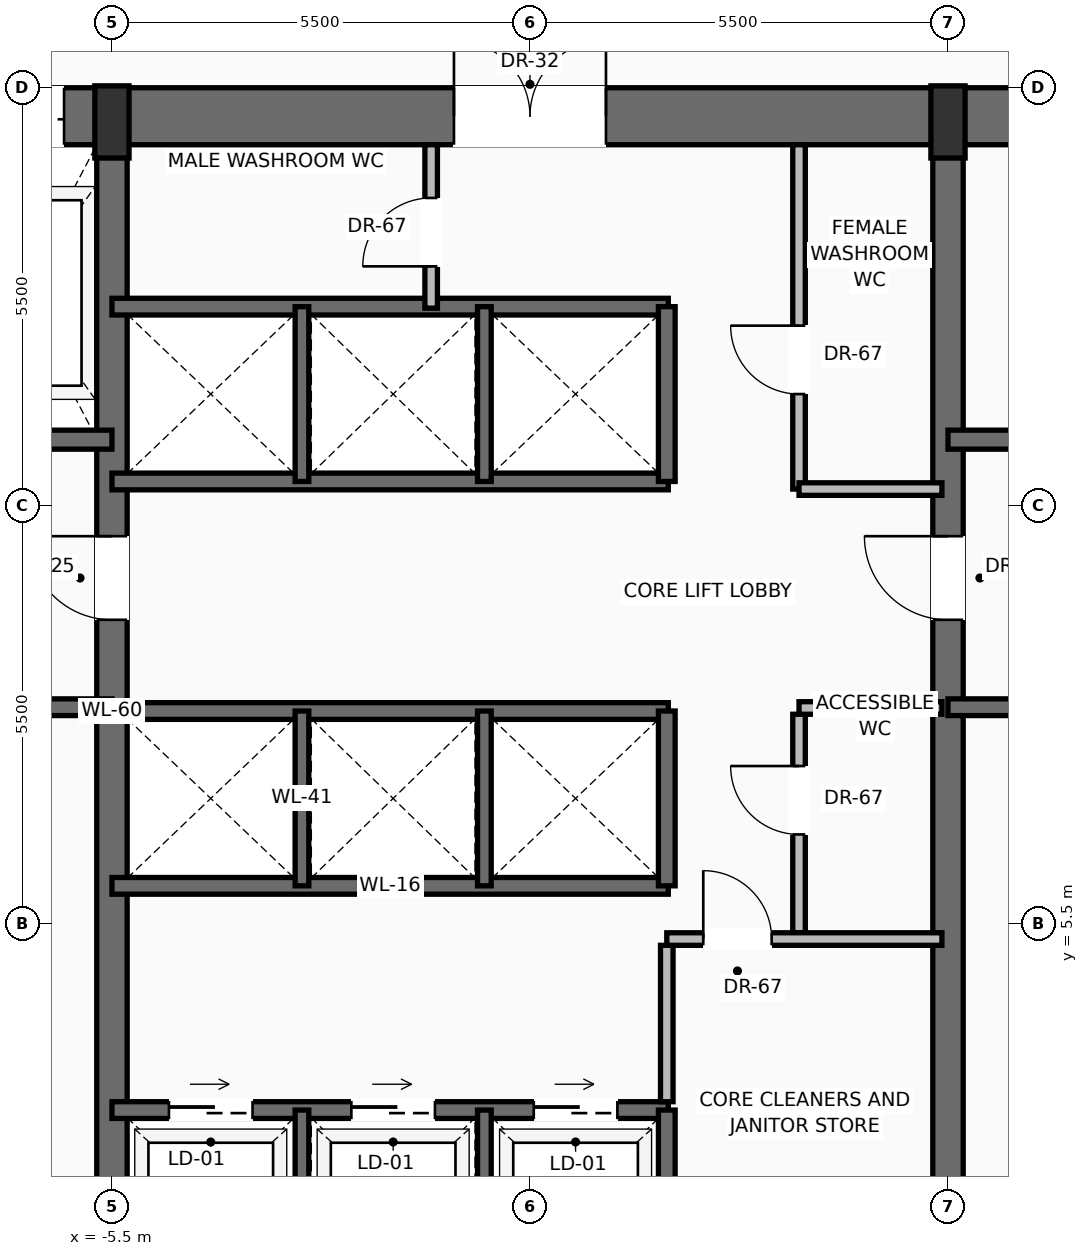
"""IFC4 building model, lengths in metres.
Left out: names, types, materials, properties, quantities, classifications, styles, units other than length and angle.
Written with IfcOpenShell. Run it as: python <this file> out.ifc"""

import sys

from ifc_helpers import new_model, si_unit, direction, frame, frame_2d, origin, origin_2d, place, context, subcontext, project, spatial, rectangle, extrude, source, transform, mapped, element, fill, save


model = new_model("IFC4")
c1 = context("Model", 3, precision=1e-05, world=origin(), true_north=direction((0.0, 1.0)))
c2 = subcontext(c1, "Body", "Model", "MODEL_VIEW")
j1 = project(units=[si_unit("LENGTHUNIT", "METRE"), si_unit("PLANEANGLEUNIT", "RADIAN")], contexts=[c1])
p1 = place(None, origin())
s1 = spatial("IfcSite", under=j1, at=p1, CompositionType="ELEMENT")
p2 = place(p1, origin())
s2 = spatial("IfcBuilding", under=s1, at=p2, CompositionType="ELEMENT")
p3 = place(p2, frame((0.0, 0.0, 84.0)))
s3 = spatial("IfcBuildingStorey", under=s2, at=p3, CompositionType="ELEMENT", Elevation=84.0)
p4 = place(p3, frame((-10.9, 16.125, 0.0), z_axis=(0.0, 0.0, 1.0), x_axis=(1.0, 0.0, 0.0)))
e1 = element("IfcWall", 1, at=p4, inside=s3, PredefinedType="SHEAR", context=c2, shape_type="SweptSolid", body=[
    extrude(rectangle(XDim=21.8, YDim=0.75, at=frame_2d((10.9, 0.0))), origin(), (0.0, 0.0, 1.0), 3.45),
])
p5 = place(p4, frame((3.47, 0.0, 0.0)))
e2 = element("IfcOpeningElement", 2, at=p5, cuts=e1, PredefinedType="OPENING", context=c2, shape_type="SweptSolid", body=[
    extrude(rectangle(XDim=1.3, YDim=2.3, at=frame_2d((0.65, 1.15))), frame((0.0, 0.385, 0.0), z_axis=(0.0, -1.0, 0.0), x_axis=(1.0, 0.0, 0.0)), (0.0, 0.0, 1.0), 0.77),
])
p6 = place(p4, frame((9.9, 0.0, 0.0)))
e3 = element("IfcOpeningElement", 3, at=p6, cuts=e1, PredefinedType="OPENING", context=c2, shape_type="SweptSolid", body=[
    extrude(rectangle(XDim=2.0, YDim=2.4, at=frame_2d((1.0, 1.2))), frame((0.0, 0.385, 0.0), z_axis=(0.0, -1.0, 0.0), x_axis=(1.0, 0.0, 0.0)), (0.0, 0.0, 1.0), 0.77),
])
p7 = place(p3, frame((-5.5, 0.475, 0.0), z_axis=(0.0, 0.0, 1.0), x_axis=(0.0, 1.0, 0.0)))
e4 = element("IfcWall", 4, at=p7, inside=s3, PredefinedType="SHEAR", context=c2, shape_type="SweptSolid", body=[
    extrude(rectangle(XDim=15.65, YDim=0.4, at=frame_2d((7.825, 0.0))), origin(), (0.0, 0.0, 1.0), 3.45),
])
p8 = place(p7, frame((9.025, 0.0, 0.0)))
e5 = element("IfcOpeningElement", 5, at=p8, cuts=e4, PredefinedType="OPENING", context=c2, shape_type="SweptSolid", body=[
    extrude(rectangle(XDim=1.1, YDim=2.2, at=frame_2d((0.55, 1.1))), frame((0.0, 0.21, 0.0), z_axis=(0.0, -1.0, 0.0), x_axis=(1.0, 0.0, 0.0)), (0.0, 0.0, 1.0), 0.42),
])
p9 = place(p3, frame((5.5, 0.475, 0.0), z_axis=(0.0, 0.0, 1.0), x_axis=(0.0, 1.0, 0.0)))
e6 = element("IfcWall", 6, at=p9, inside=s3, PredefinedType="SHEAR", context=c2, shape_type="SweptSolid", body=[
    extrude(rectangle(XDim=15.65, YDim=0.4, at=frame_2d((7.825, 0.0))), origin(), (0.0, 0.0, 1.0), 3.45),
])
p10 = place(p9, frame((9.025, 0.0, 0.0)))
e7 = element("IfcOpeningElement", 7, at=p10, cuts=e6, PredefinedType="OPENING", context=c2, shape_type="SweptSolid", body=[
    extrude(rectangle(XDim=1.1, YDim=2.2, at=frame_2d((0.55, 1.1))), frame((0.0, 0.21, 0.0), z_axis=(0.0, -1.0, 0.0), x_axis=(1.0, 0.0, 0.0)), (0.0, 0.0, 1.0), 0.42),
])
m1 = source(origin(), c2, "Body", "SweptSolid", [
    extrude(rectangle(XDim=0.45, YDim=0.95, at=origin_2d()), origin(), (0.0, 0.0, 1.0), 3.7),
])
for number, where, z_axis, x_axis in (
    (8, (-5.5, 16.05, 0.0), (0.0, 0.0, 1.0), (1.0, 0.0, 0.0)),
    (9, (5.5, 16.05, 0.0), (0.0, 0.0, 1.0), (1.0, 0.0, 0.0)),
):
    element("IfcColumn", number, at=place(p3, frame(where, z_axis=z_axis, x_axis=x_axis)), inside=s3, PredefinedType="PILASTER", context=c2, shape_type="MappedRepresentation", body=[
        mapped(m1, transform((0.0, 0.0, 0.0), scale=1.0)),
    ])
p11 = place(p3, frame((-5.5, 8.35, 0.0), z_axis=(0.0, 0.0, 1.0), x_axis=(-1.0, 0.0, 0.0)))
e10 = element("IfcWall", 10, at=p11, inside=s3, PredefinedType="SOLIDWALL", context=c2, shape_type="SweptSolid", body=[
    extrude(rectangle(XDim=4.65, YDim=0.22, at=frame_2d((2.325, 0.0))), origin(), (0.0, 0.0, 1.0), 3.45),
])
p12 = place(p11, frame((2.5, 0.0, 0.0)))
e11 = element("IfcOpeningElement", 11, at=p12, cuts=e10, PredefinedType="OPENING", context=c2, shape_type="SweptSolid", body=[
    extrude(rectangle(XDim=1.15, YDim=2.2, at=frame_2d((0.575, 1.1))), frame((0.0, 0.12, 0.0), z_axis=(0.0, -1.0, 0.0), x_axis=(1.0, 0.0, 0.0)), (0.0, 0.0, 1.0), 0.24),
])
p13 = place(p3, frame((-5.5, 11.87, 0.0), z_axis=(0.0, 0.0, 1.0), x_axis=(-1.0, 0.0, 0.0)))
e12 = element("IfcWall", 12, at=p13, inside=s3, PredefinedType="SOLIDWALL", context=c2, shape_type="SweptSolid", body=[
    extrude(rectangle(XDim=4.65, YDim=0.25, at=frame_2d((2.325, 0.0))), origin(), (0.0, 0.0, 1.0), 3.45),
])
p14 = place(p13, frame((2.95, 0.0, 0.0)))
e13 = element("IfcOpeningElement", 13, at=p14, cuts=e12, PredefinedType="OPENING", context=c2, shape_type="SweptSolid", body=[
    extrude(rectangle(XDim=1.2, YDim=2.25, at=frame_2d((0.6, 1.125))), frame((0.0, 0.135, 0.0), z_axis=(0.0, -1.0, 0.0), x_axis=(1.0, 0.0, 0.0)), (0.0, 0.0, 1.0), 0.27),
])
p15 = place(p3, frame((10.15, 8.35, 0.0), z_axis=(0.0, 0.0, 1.0), x_axis=(-1.0, 0.0, 0.0)))
e14 = element("IfcWall", 14, at=p15, inside=s3, PredefinedType="SOLIDWALL", context=c2, shape_type="SweptSolid", body=[
    extrude(rectangle(XDim=4.65, YDim=0.22, at=frame_2d((2.325, 0.0))), origin(), (0.0, 0.0, 1.0), 3.45),
])
p16 = place(p15, frame((1.0, 0.0, 0.0)))
e15 = element("IfcOpeningElement", 15, at=p16, cuts=e14, PredefinedType="OPENING", context=c2, shape_type="SweptSolid", body=[
    extrude(rectangle(XDim=1.15, YDim=2.2, at=frame_2d((0.575, 1.1))), frame((0.0, 0.12, 0.0), z_axis=(0.0, -1.0, 0.0), x_axis=(1.0, 0.0, 0.0)), (0.0, 0.0, 1.0), 0.24),
])
p17 = place(p3, frame((10.15, 11.87, 0.0), z_axis=(0.0, 0.0, 1.0), x_axis=(-1.0, 0.0, 0.0)))
e16 = element("IfcWall", 16, at=p17, inside=s3, PredefinedType="SOLIDWALL", context=c2, shape_type="SweptSolid", body=[
    extrude(rectangle(XDim=4.65, YDim=0.25, at=frame_2d((2.325, 0.0))), origin(), (0.0, 0.0, 1.0), 3.45),
])
p18 = place(p17, frame((0.5, 0.0, 0.0)))
e17 = element("IfcOpeningElement", 17, at=p18, cuts=e16, PredefinedType="OPENING", context=c2, shape_type="SweptSolid", body=[
    extrude(rectangle(XDim=1.2, YDim=2.25, at=frame_2d((0.6, 1.125))), frame((0.0, 0.135, 0.0), z_axis=(0.0, -1.0, 0.0), x_axis=(1.0, 0.0, 0.0)), (0.0, 0.0, 1.0), 0.27),
])
p19 = place(p3, frame((-5.5, 3.05, 0.0), z_axis=(0.0, 0.0, 1.0), x_axis=(1.0, 0.0, 0.0)))
e18 = element("IfcWall", 18, at=p19, inside=s3, PredefinedType="SOLIDWALL", context=c2, shape_type="SweptSolid", body=[
    extrude(rectangle(XDim=7.32, YDim=0.22, at=frame_2d((3.66, 0.0))), origin(), (0.0, 0.0, 1.0), 3.45),
])
p20 = place(p19, frame((0.75, 0.0, 0.0)))
e19 = element("IfcOpeningElement", 19, at=p20, cuts=e18, PredefinedType="OPENING", context=c2, shape_type="SweptSolid", body=[
    extrude(rectangle(XDim=1.1, YDim=2.2, at=frame_2d((0.55, 1.1))), frame((0.0, 0.12, 0.0), z_axis=(0.0, -1.0, 0.0), x_axis=(1.0, 0.0, 0.0)), (0.0, 0.0, 1.0), 0.24),
])
p21 = place(p19, frame((3.15, 0.0, 0.0)))
e20 = element("IfcOpeningElement", 20, at=p21, cuts=e18, PredefinedType="OPENING", context=c2, shape_type="SweptSolid", body=[
    extrude(rectangle(XDim=1.1, YDim=2.2, at=frame_2d((0.55, 1.1))), frame((0.0, 0.12, 0.0), z_axis=(0.0, -1.0, 0.0), x_axis=(1.0, 0.0, 0.0)), (0.0, 0.0, 1.0), 0.24),
])
p22 = place(p19, frame((5.55, 0.0, 0.0)))
e21 = element("IfcOpeningElement", 21, at=p22, cuts=e18, PredefinedType="OPENING", context=c2, shape_type="SweptSolid", body=[
    extrude(rectangle(XDim=1.1, YDim=2.2, at=frame_2d((0.55, 1.1))), frame((0.0, 0.12, 0.0), z_axis=(0.0, -1.0, 0.0), x_axis=(1.0, 0.0, 0.0)), (0.0, 0.0, 1.0), 0.24),
])
p23 = place(p3, frame((1.8, 0.85, 0.0), z_axis=(0.0, 0.0, 1.0), x_axis=(0.0, 1.0, 0.0)))
e22 = element("IfcWall", 22, at=p23, inside=s3, PredefinedType="SOLIDWALL", context=c2, shape_type="SweptSolid", body=[
    extrude(rectangle(XDim=2.2, YDim=0.22, at=frame_2d((1.1, 0.0))), origin(), (0.0, 0.0, 1.0), 3.45),
])
for number, where, z_axis, x_axis in (
    (23, (-3.0, 0.85, 0.0), (0.0, 0.0, 1.0), (0.0, 1.0, 0.0)),
    (24, (-0.6, 0.85, 0.0), (0.0, 0.0, 1.0), (0.0, 1.0, 0.0)),
):
    element("IfcWall", number, at=place(p3, frame(where, z_axis=z_axis, x_axis=x_axis)), inside=s3, PredefinedType="SOLIDWALL", context=c2, shape_type="SweptSolid", body=[
        extrude(rectangle(XDim=2.2, YDim=0.18, at=frame_2d((1.1, 0.0))), origin(), (0.0, 0.0, 1.0), 3.45),
    ])
p24 = place(p3, frame((1.8, 3.16, 0.0), z_axis=(0.0, 0.0, 1.0), x_axis=(0.0, 1.0, 0.0)))
e25 = element("IfcWall", 25, at=p24, inside=s3, PredefinedType="PARTITIONING", context=c2, shape_type="SweptSolid", body=[
    extrude(rectangle(XDim=2.058, YDim=0.165, at=frame_2d((1.029, 0.0))), origin(), (0.0, 0.0, 1.0), 3.442),
])
p25 = place(p3, frame((3.54, 5.383, 0.0), z_axis=(0.0, 0.0, 1.0), x_axis=(0.0, 1.0, 0.0)))
e26 = element("IfcWall", 26, at=p25, inside=s3, PredefinedType="PARTITIONING", context=c2, shape_type="SweptSolid", body=[
    extrude(rectangle(XDim=2.875, YDim=0.165, at=frame_2d((1.438, 0.0))), origin(), (0.0, 0.0, 1.0), 3.442),
])
p26 = place(p25, frame((1.294, 0.0, 0.0)))
e27 = element("IfcOpeningElement", 27, at=p26, cuts=e26, PredefinedType="OPENING", context=c2, shape_type="SweptSolid", body=[
    extrude(rectangle(XDim=0.9, YDim=2.1, at=frame_2d((0.45, 1.05))), frame((0.0, 0.093, 0.0), z_axis=(0.0, -1.0, 0.0), x_axis=(1.0, 0.0, 0.0)), (0.0, 0.0, 1.0), 0.185),
])
p27 = place(p3, frame((3.54, 8.34, 0.0), z_axis=(0.0, 0.0, 1.0), x_axis=(1.0, 0.0, 0.0)))
e28 = element("IfcWall", 28, at=p27, inside=s3, PredefinedType="PARTITIONING", context=c2, shape_type="SweptSolid", body=[
    extrude(rectangle(XDim=1.88, YDim=0.165, at=frame_2d((0.94, 0.0))), origin(), (0.0, 0.0, 1.0), 3.442),
])
p28 = place(p3, frame((1.8, 5.3, 0.0), z_axis=(0.0, 0.0, 1.0), x_axis=(1.0, 0.0, 0.0)))
e29 = element("IfcWall", 29, at=p28, inside=s3, PredefinedType="PARTITIONING", context=c2, shape_type="SweptSolid", body=[
    extrude(rectangle(XDim=3.62, YDim=0.165, at=frame_2d((1.81, 0.0))), origin(), (0.0, 0.0, 1.0), 3.442),
])
p29 = place(p28, frame((0.48, 0.0, 0.0)))
e30 = element("IfcOpeningElement", 30, at=p29, cuts=e29, PredefinedType="OPENING", context=c2, shape_type="SweptSolid", body=[
    extrude(rectangle(XDim=0.9, YDim=2.1, at=frame_2d((0.45, 1.05))), frame((0.0, 0.093, 0.0), z_axis=(0.0, -1.0, 0.0), x_axis=(1.0, 0.0, 0.0)), (0.0, 0.0, 1.0), 0.185),
])
for number, where, z_axis, x_axis in (
    (31, (-5.5, 6.0, 0.0), (0.0, 0.0, 1.0), (1.0, 0.0, 0.0)),
    (32, (-5.5, 8.3, 0.0), (0.0, 0.0, 1.0), (1.0, 0.0, 0.0)),
):
    element("IfcWall", number, at=place(p3, frame(where, z_axis=z_axis, x_axis=x_axis)), inside=s3, PredefinedType="SOLIDWALL", context=c2, shape_type="SweptSolid", body=[
        extrude(rectangle(XDim=7.32, YDim=0.22, at=frame_2d((3.66, 0.0))), origin(), (0.0, 0.0, 1.0), 3.45),
    ])
p30 = place(p3, frame((1.8, 6.0, 0.0), z_axis=(0.0, 0.0, 1.0), x_axis=(0.0, 1.0, 0.0)))
e33 = element("IfcWall", 33, at=p30, inside=s3, PredefinedType="SOLIDWALL", context=c2, shape_type="SweptSolid", body=[
    extrude(rectangle(XDim=2.3, YDim=0.22, at=frame_2d((1.15, 0.0))), origin(), (0.0, 0.0, 1.0), 3.45),
])
for number, where, z_axis, x_axis in (
    (34, (-3.0, 6.0, 0.0), (0.0, 0.0, 1.0), (0.0, 1.0, 0.0)),
    (35, (-0.6, 6.0, 0.0), (0.0, 0.0, 1.0), (0.0, 1.0, 0.0)),
):
    element("IfcWall", number, at=place(p3, frame(where, z_axis=z_axis, x_axis=x_axis)), inside=s3, PredefinedType="SOLIDWALL", context=c2, shape_type="SweptSolid", body=[
        extrude(rectangle(XDim=2.3, YDim=0.18, at=frame_2d((1.15, 0.0))), origin(), (0.0, 0.0, 1.0), 3.45),
    ])
for number, where, z_axis, x_axis in (
    (36, (-5.5, 11.32, 0.0), (0.0, 0.0, 1.0), (1.0, 0.0, 0.0)),
    (37, (-5.5, 13.62, 0.0), (0.0, 0.0, 1.0), (1.0, 0.0, 0.0)),
):
    element("IfcWall", number, at=place(p3, frame(where, z_axis=z_axis, x_axis=x_axis)), inside=s3, PredefinedType="SOLIDWALL", context=c2, shape_type="SweptSolid", body=[
        extrude(rectangle(XDim=7.32, YDim=0.22, at=frame_2d((3.66, 0.0))), origin(), (0.0, 0.0, 1.0), 3.45),
    ])
p31 = place(p3, frame((1.8, 11.32, 0.0), z_axis=(0.0, 0.0, 1.0), x_axis=(0.0, 1.0, 0.0)))
e38 = element("IfcWall", 38, at=p31, inside=s3, PredefinedType="SOLIDWALL", context=c2, shape_type="SweptSolid", body=[
    extrude(rectangle(XDim=2.3, YDim=0.22, at=frame_2d((1.15, 0.0))), origin(), (0.0, 0.0, 1.0), 3.45),
])
for number, where, z_axis, x_axis in (
    (39, (-3.0, 11.32, 0.0), (0.0, 0.0, 1.0), (0.0, 1.0, 0.0)),
    (40, (-0.6, 11.32, 0.0), (0.0, 0.0, 1.0), (0.0, 1.0, 0.0)),
):
    element("IfcWall", number, at=place(p3, frame(where, z_axis=z_axis, x_axis=x_axis)), inside=s3, PredefinedType="SOLIDWALL", context=c2, shape_type="SweptSolid", body=[
        extrude(rectangle(XDim=2.3, YDim=0.18, at=frame_2d((1.15, 0.0))), origin(), (0.0, 0.0, 1.0), 3.45),
    ])
p32 = place(p3, frame((-1.3, 13.6, 0.0), z_axis=(0.0, 0.0, 1.0), x_axis=(0.0, 1.0, 0.0)))
e41 = element("IfcWall", 41, at=p32, inside=s3, PredefinedType="PARTITIONING", context=c2, shape_type="SweptSolid", body=[
    extrude(rectangle(XDim=2.15, YDim=0.165, at=frame_2d((1.075, 0.0))), origin(), (0.0, 0.0, 1.0), 3.442),
])
p33 = place(p32, frame((0.55, 0.0, 0.0)))
e42 = element("IfcOpeningElement", 42, at=p33, cuts=e41, PredefinedType="OPENING", context=c2, shape_type="SweptSolid", body=[
    extrude(rectangle(XDim=0.9, YDim=2.1, at=frame_2d((0.45, 1.05))), frame((0.0, 0.093, 0.0), z_axis=(0.0, -1.0, 0.0), x_axis=(1.0, 0.0, 0.0)), (0.0, 0.0, 1.0), 0.185),
])
p34 = place(p3, frame((3.54, 11.22, 0.0), z_axis=(0.0, 0.0, 1.0), x_axis=(0.0, 1.0, 0.0)))
e43 = element("IfcWall", 43, at=p34, inside=s3, PredefinedType="PARTITIONING", context=c2, shape_type="SweptSolid", body=[
    extrude(rectangle(XDim=4.53, YDim=0.165, at=frame_2d((2.265, 0.0))), origin(), (0.0, 0.0, 1.0), 3.442),
])
p35 = place(p34, frame((1.25, 0.0, 0.0)))
e44 = element("IfcOpeningElement", 44, at=p35, cuts=e43, PredefinedType="OPENING", context=c2, shape_type="SweptSolid", body=[
    extrude(rectangle(XDim=0.9, YDim=2.1, at=frame_2d((0.45, 1.05))), frame((0.0, 0.093, 0.0), z_axis=(0.0, -1.0, 0.0), x_axis=(1.0, 0.0, 0.0)), (0.0, 0.0, 1.0), 0.185),
])
p36 = place(p3, frame((3.54, 11.22, 0.0), z_axis=(0.0, 0.0, 1.0), x_axis=(1.0, 0.0, 0.0)))
e45 = element("IfcWall", 45, at=p36, inside=s3, PredefinedType="PARTITIONING", context=c2, shape_type="SweptSolid", body=[
    extrude(rectangle(XDim=1.88, YDim=0.165, at=frame_2d((0.94, 0.0))), origin(), (0.0, 0.0, 1.0), 3.442),
])
m2 = source(origin(), c2, "Body", "SweptSolid", [
    extrude(rectangle(XDim=1.1, YDim=2.2, at=frame_2d((0.55, 1.1))), frame((0.0, 0.025, 0.0), z_axis=(0.0, -1.0, 0.0), x_axis=(1.0, 0.0, 0.0)), (0.0, 0.0, 1.0), 0.05),
])
p37 = place(p8, origin())
e46 = element("IfcDoor", 46, at=p37, inside=s3, OperationType="SINGLE_SWING_RIGHT", PredefinedType="DOOR", context=c2, shape_type="MappedRepresentation", body=[
    mapped(m2, transform((0.0, 0.0, 0.0), scale=1.0)),
])
fill(e5, e46)
m3 = source(origin(), c2, "Body", "SweptSolid", [
    extrude(rectangle(XDim=1.3, YDim=2.3, at=frame_2d((0.65, 1.15))), frame((0.0, 0.025, 0.0), z_axis=(0.0, -1.0, 0.0), x_axis=(1.0, 0.0, 0.0)), (0.0, 0.0, 1.0), 0.05),
])
p38 = place(p5, origin())
e47 = element("IfcDoor", 47, at=p38, inside=s3, OperationType="SLIDING_TO_RIGHT", PredefinedType="DOOR", context=c2, shape_type="MappedRepresentation", body=[
    mapped(m3, transform((0.0, 0.0, 0.0), scale=1.0)),
])
fill(e2, e47)
p39 = place(p10, origin())
e48 = element("IfcDoor", 48, at=p39, inside=s3, OperationType="SINGLE_SWING_RIGHT", PredefinedType="DOOR", context=c2, shape_type="MappedRepresentation", body=[
    mapped(m2, transform((0.0, 0.0, 0.0), scale=1.0)),
])
fill(e7, e48)
m4 = source(origin(), c2, "Body", "SweptSolid", [
    extrude(rectangle(XDim=2.0, YDim=2.4, at=frame_2d((1.0, 1.2))), frame((0.0, 0.025, 0.0), z_axis=(0.0, -1.0, 0.0), x_axis=(1.0, 0.0, 0.0)), (0.0, 0.0, 1.0), 0.05),
])
p40 = place(p6, origin())
e49 = element("IfcDoor", 49, at=p40, inside=s3, OperationType="DOUBLE_DOOR_SINGLE_SWING", PredefinedType="DOOR", context=c2, shape_type="MappedRepresentation", body=[
    mapped(m4, transform((0.0, 0.0, 0.0), scale=1.0)),
])
fill(e3, e49)
m5 = source(origin(), c2, "Body", "SweptSolid", [
    extrude(rectangle(XDim=1.1, YDim=2.2, at=frame_2d((0.55, 1.1))), frame((0.0, 0.025, 0.0), z_axis=(0.0, -1.0, 0.0), x_axis=(1.0, 0.0, 0.0)), (0.0, 0.0, 1.0), 0.05),
])
p41 = place(p20, origin())
e50 = element("IfcDoor", 50, at=p41, inside=s3, OperationType="SLIDING_TO_RIGHT", PredefinedType="DOOR", context=c2, shape_type="MappedRepresentation", body=[
    mapped(m5, transform((0.0, 0.0, 0.0), scale=1.0)),
])
fill(e19, e50)
p42 = place(p21, origin())
e51 = element("IfcDoor", 51, at=p42, inside=s3, OperationType="SLIDING_TO_RIGHT", PredefinedType="DOOR", context=c2, shape_type="MappedRepresentation", body=[
    mapped(m5, transform((0.0, 0.0, 0.0), scale=1.0)),
])
fill(e20, e51)
p43 = place(p22, origin())
e52 = element("IfcDoor", 52, at=p43, inside=s3, OperationType="SLIDING_TO_RIGHT", PredefinedType="DOOR", context=c2, shape_type="MappedRepresentation", body=[
    mapped(m5, transform((0.0, 0.0, 0.0), scale=1.0)),
])
fill(e21, e52)
m6 = source(origin(), c2, "Body", "SweptSolid", [
    extrude(rectangle(XDim=0.9, YDim=2.1, at=frame_2d((0.45, 1.05))), frame((0.0, 0.025, 0.0), z_axis=(0.0, -1.0, 0.0), x_axis=(1.0, 0.0, 0.0)), (0.0, 0.0, 1.0), 0.05),
])
p44 = place(p29, origin())
e53 = element("IfcDoor", 53, at=p44, inside=s3, OperationType="SINGLE_SWING_LEFT", PredefinedType="DOOR", context=c2, shape_type="MappedRepresentation", body=[
    mapped(m6, transform((0.0, 0.0, 0.0), scale=1.0)),
])
fill(e30, e53)
p45 = place(p26, origin())
e54 = element("IfcDoor", 54, at=p45, inside=s3, OperationType="SINGLE_SWING_RIGHT", PredefinedType="DOOR", context=c2, shape_type="MappedRepresentation", body=[
    mapped(m6, transform((0.0, 0.0, 0.0), scale=1.0)),
])
fill(e27, e54)
p46 = place(p33, origin())
e55 = element("IfcDoor", 55, at=p46, inside=s3, OperationType="SINGLE_SWING_LEFT", PredefinedType="DOOR", context=c2, shape_type="MappedRepresentation", body=[
    mapped(m6, transform((0.0, 0.0, 0.0), scale=1.0)),
])
fill(e42, e55)
p47 = place(p35, origin())
e56 = element("IfcDoor", 56, at=p47, inside=s3, OperationType="SINGLE_SWING_RIGHT", PredefinedType="DOOR", context=c2, shape_type="MappedRepresentation", body=[
    mapped(m6, transform((0.0, 0.0, 0.0), scale=1.0)),
])
fill(e44, e56)
save(model, sys.argv[1])
